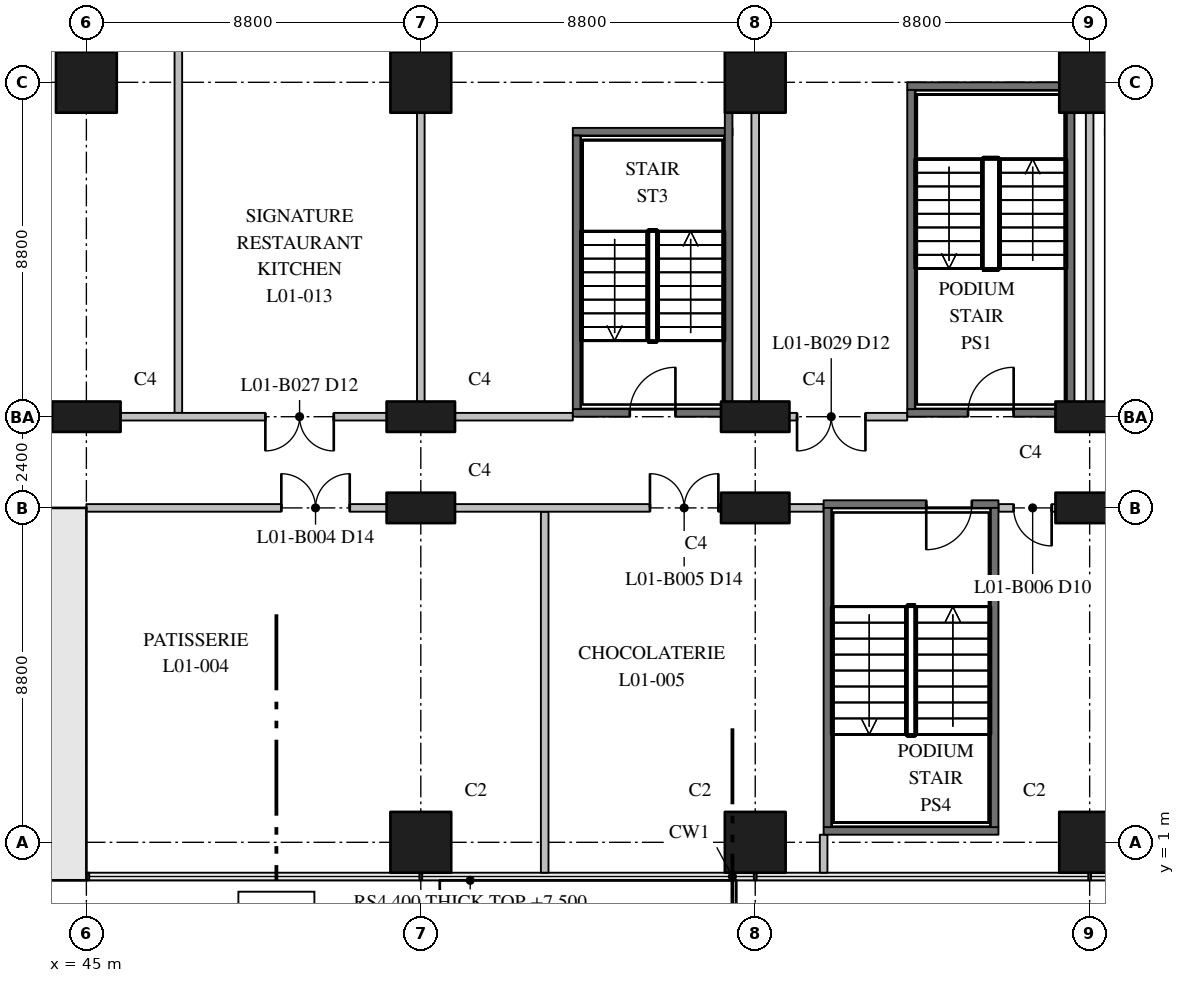
"""IFC4 building model, lengths in metres.
Left out: names, types, materials, properties, quantities, classifications, styles, units other than length and angle.
Written with IfcOpenShell. Run it as: python <this file> out.ifc"""

import sys

from ifc_helpers import new_model, si_unit, direction, frame, frame_2d, origin, origin_2d, place, context, subcontext, project, spatial, rectangle, extrude, element, fill, save


model = new_model("IFC4")
c1 = context("Model", 3, precision=1e-05, world=origin(), true_north=direction((0.0, 1.0)))
c2 = subcontext(c1, "Body", "Model", "MODEL_VIEW")
j1 = project(units=[si_unit("LENGTHUNIT", "METRE"), si_unit("PLANEANGLEUNIT", "RADIAN")], contexts=[c1])
p1 = place(None, origin())
s1 = spatial("IfcSite", under=j1, at=p1, CompositionType="ELEMENT")
p2 = place(p1, origin())
s2 = spatial("IfcBuilding", under=s1, at=p2, CompositionType="ELEMENT")
p3 = place(p2, frame((0.0, 0.0, 7.5)))
s3 = spatial("IfcBuildingStorey", under=s2, at=p3, CompositionType="ELEMENT", Elevation=7.5)
p4 = place(p3, frame((45.0, 12.2, 0.0), z_axis=(0.0, 0.0, 1.0), x_axis=(1.0, 0.0, 0.0)))
e1 = element("IfcColumn", 1, at=p4, inside=s3, PredefinedType="COLUMN", context=c2, shape_type="SweptSolid", body=[
    extrude(rectangle(XDim=1.8, YDim=0.8, at=origin_2d()), origin(), (0.0, 0.0, 1.0), 5.5),
])
for number, where, z_axis, x_axis in (
    (2, (45.0, 21.0, 0.0), (0.0, 0.0, 1.0), (1.0, 0.0, 0.0)),
    (3, (53.8, 1.0, 0.0), (0.0, 0.0, 1.0), (1.0, 0.0, 0.0)),
):
    element("IfcColumn", number, at=place(p3, frame(where, z_axis=z_axis, x_axis=x_axis)), inside=s3, PredefinedType="COLUMN", context=c2, shape_type="SweptSolid", body=[
        extrude(rectangle(XDim=1.6, YDim=1.6, at=origin_2d()), origin(), (0.0, 0.0, 1.0), 5.5),
    ])
for number, where, z_axis, x_axis in (
    (4, (53.8, 9.8, 0.0), (0.0, 0.0, 1.0), (1.0, 0.0, 0.0)),
    (5, (53.8, 12.2, 0.0), (0.0, 0.0, 1.0), (1.0, 0.0, 0.0)),
):
    element("IfcColumn", number, at=place(p3, frame(where, z_axis=z_axis, x_axis=x_axis)), inside=s3, PredefinedType="COLUMN", context=c2, shape_type="SweptSolid", body=[
        extrude(rectangle(XDim=1.8, YDim=0.8, at=origin_2d()), origin(), (0.0, 0.0, 1.0), 5.5),
    ])
for number, where, z_axis, x_axis in (
    (6, (53.8, 21.0, 0.0), (0.0, 0.0, 1.0), (1.0, 0.0, 0.0)),
    (7, (62.6, 1.0, 0.0), (0.0, 0.0, 1.0), (1.0, 0.0, 0.0)),
):
    element("IfcColumn", number, at=place(p3, frame(where, z_axis=z_axis, x_axis=x_axis)), inside=s3, PredefinedType="COLUMN", context=c2, shape_type="SweptSolid", body=[
        extrude(rectangle(XDim=1.6, YDim=1.6, at=origin_2d()), origin(), (0.0, 0.0, 1.0), 5.5),
    ])
for number, where, z_axis, x_axis in (
    (8, (62.6, 9.8, 0.0), (0.0, 0.0, 1.0), (1.0, 0.0, 0.0)),
    (9, (62.6, 12.2, 0.0), (0.0, 0.0, 1.0), (1.0, 0.0, 0.0)),
):
    element("IfcColumn", number, at=place(p3, frame(where, z_axis=z_axis, x_axis=x_axis)), inside=s3, PredefinedType="COLUMN", context=c2, shape_type="SweptSolid", body=[
        extrude(rectangle(XDim=1.8, YDim=0.8, at=origin_2d()), origin(), (0.0, 0.0, 1.0), 5.5),
    ])
for number, where, z_axis, x_axis in (
    (10, (62.6, 21.0, 0.0), (0.0, 0.0, 1.0), (1.0, 0.0, 0.0)),
    (11, (71.4, 1.0, 0.0), (0.0, 0.0, 1.0), (1.0, 0.0, 0.0)),
):
    element("IfcColumn", number, at=place(p3, frame(where, z_axis=z_axis, x_axis=x_axis)), inside=s3, PredefinedType="COLUMN", context=c2, shape_type="SweptSolid", body=[
        extrude(rectangle(XDim=1.6, YDim=1.6, at=origin_2d()), origin(), (0.0, 0.0, 1.0), 5.5),
    ])
for number, where, z_axis, x_axis in (
    (12, (71.4, 9.8, 0.0), (0.0, 0.0, 1.0), (1.0, 0.0, 0.0)),
    (13, (71.4, 12.2, 0.0), (0.0, 0.0, 1.0), (1.0, 0.0, 0.0)),
):
    element("IfcColumn", number, at=place(p3, frame(where, z_axis=z_axis, x_axis=x_axis)), inside=s3, PredefinedType="COLUMN", context=c2, shape_type="SweptSolid", body=[
        extrude(rectangle(XDim=1.8, YDim=0.8, at=origin_2d()), origin(), (0.0, 0.0, 1.0), 5.5),
    ])
p5 = place(p3, frame((71.4, 21.0, 0.0), z_axis=(0.0, 0.0, 1.0), x_axis=(1.0, 0.0, 0.0)))
e14 = element("IfcColumn", 14, at=p5, inside=s3, PredefinedType="COLUMN", context=c2, shape_type="SweptSolid", body=[
    extrude(rectangle(XDim=1.6, YDim=1.6, at=origin_2d()), origin(), (0.0, 0.0, 1.0), 5.5),
])
p6 = place(p3, frame((9.8, 0.6, 0.0), z_axis=(0.0, 0.0, 1.0), x_axis=(1.0, 0.0, 0.0)))
e15 = element("IfcWall", 15, at=p6, inside=s3, PredefinedType="SHEAR", context=c2, shape_type="SweptSolid", body=[
    extrude(rectangle(XDim=35.2, YDim=1.2, at=frame_2d((17.6, 0.0))), origin(), (0.0, 0.0, 1.0), 5.5),
])
p7 = place(p3, frame((44.4, 1.2, 0.0), z_axis=(0.0, 0.0, 1.0), x_axis=(0.0, 1.0, 0.0)))
e16 = element("IfcWall", 16, at=p7, inside=s3, PredefinedType="SHEAR", context=c2, shape_type="SweptSolid", body=[
    extrude(rectangle(XDim=8.6, YDim=1.2, at=frame_2d((4.3, 0.0))), origin(), (0.0, 0.0, 1.0), 5.5),
])
p8 = place(p3, frame((40.7, 9.6, 0.0), z_axis=(0.0, 0.0, 1.0), x_axis=(1.0, 0.0, 0.0)))
e17 = element("IfcWall", 17, at=p8, inside=s3, PredefinedType="SHEAR", context=c2, shape_type="SweptSolid", body=[
    extrude(rectangle(XDim=4.3, YDim=0.4, at=frame_2d((2.15, 0.0))), origin(), (0.0, 0.0, 1.0), 5.5),
])
p9 = place(p8, frame((1.05, 0.0, 0.0)))
e18 = element("IfcOpeningElement", 18, at=p9, cuts=e17, PredefinedType="OPENING", context=c2, shape_type="SweptSolid", body=[
    extrude(rectangle(XDim=1.2, YDim=2.1, at=frame_2d((0.6, 1.05))), frame((0.0, 0.21, 0.0), z_axis=(0.0, -1.0, 0.0), x_axis=(1.0, 0.0, 0.0)), (0.0, 0.0, 1.0), 0.42),
])
p10 = place(p3, frame((57.8, 12.3, 0.0), z_axis=(0.0, 0.0, 1.0), x_axis=(1.0, 0.0, 0.0)))
e19 = element("IfcWall", 19, at=p10, inside=s3, PredefinedType="SHEAR", context=c2, shape_type="SweptSolid", body=[
    extrude(rectangle(XDim=4.2, YDim=0.2, at=frame_2d((2.1, 0.0))), origin(), (0.0, 0.0, 1.0), 5.1),
])
p11 = place(p10, frame((1.5, 0.0, 0.0)))
e20 = element("IfcOpeningElement", 20, at=p11, cuts=e19, PredefinedType="OPENING", context=c2, shape_type="SweptSolid", body=[
    extrude(rectangle(XDim=1.2, YDim=2.1, at=frame_2d((0.6, 1.05))), frame((0.0, 0.11, 0.0), z_axis=(0.0, -1.0, 0.0), x_axis=(1.0, 0.0, 0.0)), (0.0, 0.0, 1.0), 0.22),
])
p12 = place(p3, frame((57.8, 19.7, 0.0), z_axis=(0.0, 0.0, 1.0), x_axis=(1.0, 0.0, 0.0)))
e21 = element("IfcWall", 21, at=p12, inside=s3, PredefinedType="SHEAR", context=c2, shape_type="SweptSolid", body=[
    extrude(rectangle(XDim=4.2, YDim=0.2, at=frame_2d((2.1, 0.0))), origin(), (0.0, 0.0, 1.0), 5.1),
])
p13 = place(p3, frame((57.9, 12.4, 0.0), z_axis=(0.0, 0.0, 1.0), x_axis=(0.0, 1.0, 0.0)))
e22 = element("IfcWall", 22, at=p13, inside=s3, PredefinedType="SHEAR", context=c2, shape_type="SweptSolid", body=[
    extrude(rectangle(XDim=7.2, YDim=0.2, at=frame_2d((3.6, 0.0))), origin(), (0.0, 0.0, 1.0), 5.1),
])
for number, where, z_axis, x_axis in (
    (23, (61.9, 12.4, 0.0), (0.0, 0.0, 1.0), (0.0, 1.0, 0.0)),
    (24, (71.9, 12.4, 0.0), (0.0, 0.0, 1.0), (0.0, 1.0, 0.0)),
):
    element("IfcWall", number, at=place(p3, frame(where, z_axis=z_axis, x_axis=x_axis)), inside=s3, PredefinedType="SHEAR", context=c2, shape_type="SweptSolid", body=[
        extrude(rectangle(XDim=7.8, YDim=0.2, at=frame_2d((3.9, 0.0))), origin(), (0.0, 0.0, 1.0), 5.1),
    ])
p14 = place(p3, frame((66.6, 12.3, 0.0), z_axis=(0.0, 0.0, 1.0), x_axis=(1.0, 0.0, 0.0)))
e25 = element("IfcWall", 25, at=p14, inside=s3, PredefinedType="SHEAR", context=c2, shape_type="SweptSolid", body=[
    extrude(rectangle(XDim=4.4, YDim=0.2, at=frame_2d((2.2, 0.0))), origin(), (0.0, 0.0, 1.0), 5.1),
])
p15 = place(p14, frame((1.6, 0.0, 0.0)))
e26 = element("IfcOpeningElement", 26, at=p15, cuts=e25, PredefinedType="OPENING", context=c2, shape_type="SweptSolid", body=[
    extrude(rectangle(XDim=1.2, YDim=2.1, at=frame_2d((0.6, 1.05))), frame((0.0, 0.11, 0.0), z_axis=(0.0, -1.0, 0.0), x_axis=(1.0, 0.0, 0.0)), (0.0, 0.0, 1.0), 0.22),
])
p16 = place(p3, frame((66.6, 20.9, 0.0), z_axis=(0.0, 0.0, 1.0), x_axis=(1.0, 0.0, 0.0)))
e27 = element("IfcWall", 27, at=p16, inside=s3, PredefinedType="SHEAR", context=c2, shape_type="SweptSolid", body=[
    extrude(rectangle(XDim=4.4, YDim=0.2, at=frame_2d((2.2, 0.0))), origin(), (0.0, 0.0, 1.0), 5.1),
])
for number, where, z_axis, x_axis in (
    (28, (66.7, 12.4, 0.0), (0.0, 0.0, 1.0), (0.0, 1.0, 0.0)),
    (29, (70.9, 12.4, 0.0), (0.0, 0.0, 1.0), (0.0, 1.0, 0.0)),
):
    element("IfcWall", number, at=place(p3, frame(where, z_axis=z_axis, x_axis=x_axis)), inside=s3, PredefinedType="SHEAR", context=c2, shape_type="SweptSolid", body=[
        extrude(rectangle(XDim=8.4, YDim=0.2, at=frame_2d((4.2, 0.0))), origin(), (0.0, 0.0, 1.0), 5.1),
    ])
p17 = place(p3, frame((64.4, 9.9, 0.0), z_axis=(0.0, 0.0, 1.0), x_axis=(1.0, 0.0, 0.0)))
e30 = element("IfcWall", 30, at=p17, inside=s3, PredefinedType="SHEAR", context=c2, shape_type="SweptSolid", body=[
    extrude(rectangle(XDim=4.6, YDim=0.2, at=frame_2d((2.3, 0.0))), origin(), (0.0, 0.0, 1.0), 5.1),
])
p18 = place(p17, frame((2.7, 0.0, 0.0)))
e31 = element("IfcOpeningElement", 31, at=p18, cuts=e30, PredefinedType="OPENING", context=c2, shape_type="SweptSolid", body=[
    extrude(rectangle(XDim=1.2, YDim=2.1, at=frame_2d((0.6, 1.05))), frame((0.0, 0.11, 0.0), z_axis=(0.0, -1.0, 0.0), x_axis=(1.0, 0.0, 0.0)), (0.0, 0.0, 1.0), 0.22),
])
p19 = place(p3, frame((64.4, 1.3, 0.0), z_axis=(0.0, 0.0, 1.0), x_axis=(1.0, 0.0, 0.0)))
e32 = element("IfcWall", 32, at=p19, inside=s3, PredefinedType="SHEAR", context=c2, shape_type="SweptSolid", body=[
    extrude(rectangle(XDim=4.6, YDim=0.2, at=frame_2d((2.3, 0.0))), origin(), (0.0, 0.0, 1.0), 5.1),
])
for number, where, z_axis, x_axis in (
    (33, (64.5, 1.4, 0.0), (0.0, 0.0, 1.0), (0.0, 1.0, 0.0)),
    (34, (68.9, 1.4, 0.0), (0.0, 0.0, 1.0), (0.0, 1.0, 0.0)),
):
    element("IfcWall", number, at=place(p3, frame(where, z_axis=z_axis, x_axis=x_axis)), inside=s3, PredefinedType="SHEAR", context=c2, shape_type="SweptSolid", body=[
        extrude(rectangle(XDim=8.4, YDim=0.2, at=frame_2d((4.2, 0.0))), origin(), (0.0, 0.0, 1.0), 5.1),
    ])
p20 = place(p3, frame((45.0, 9.8, 0.0), z_axis=(0.0, 0.0, 1.0), x_axis=(1.0, 0.0, 0.0)))
e35 = element("IfcWall", 35, at=p20, inside=s3, PredefinedType="PARTITIONING", context=c2, shape_type="SweptSolid", body=[
    extrude(rectangle(XDim=19.4, YDim=0.2, at=frame_2d((9.7, 0.0))), origin(), (0.0, 0.0, 1.0), 5.1),
])
p21 = place(p20, frame((5.13, 0.0, 0.0)))
e36 = element("IfcOpeningElement", 36, at=p21, cuts=e35, PredefinedType="OPENING", context=c2, shape_type="SweptSolid", body=[
    extrude(rectangle(XDim=1.8, YDim=2.4, at=frame_2d((0.9, 1.2))), frame((0.0, 0.11, 0.0), z_axis=(0.0, -1.0, 0.0), x_axis=(1.0, 0.0, 0.0)), (0.0, 0.0, 1.0), 0.22),
])
p22 = place(p20, frame((14.83, 0.0, 0.0)))
e37 = element("IfcOpeningElement", 37, at=p22, cuts=e35, PredefinedType="OPENING", context=c2, shape_type="SweptSolid", body=[
    extrude(rectangle(XDim=1.8, YDim=2.4, at=frame_2d((0.9, 1.2))), frame((0.0, 0.11, 0.0), z_axis=(0.0, -1.0, 0.0), x_axis=(1.0, 0.0, 0.0)), (0.0, 0.0, 1.0), 0.22),
])
p23 = place(p3, frame((69.0, 9.8, 0.0), z_axis=(0.0, 0.0, 1.0), x_axis=(1.0, 0.0, 0.0)))
e38 = element("IfcWall", 38, at=p23, inside=s3, PredefinedType="PARTITIONING", context=c2, shape_type="SweptSolid", body=[
    extrude(rectangle(XDim=3.8, YDim=0.2, at=frame_2d((1.9, 0.0))), origin(), (0.0, 0.0, 1.0), 5.1),
])
p24 = place(p23, frame((0.4, 0.0, 0.0)))
e39 = element("IfcOpeningElement", 39, at=p24, cuts=e38, PredefinedType="OPENING", context=c2, shape_type="SweptSolid", body=[
    extrude(rectangle(XDim=1.0, YDim=2.1, at=frame_2d((0.5, 1.05))), frame((0.0, 0.11, 0.0), z_axis=(0.0, -1.0, 0.0), x_axis=(1.0, 0.0, 0.0)), (0.0, 0.0, 1.0), 0.22),
])
p25 = place(p3, frame((35.4, 12.2, 0.0), z_axis=(0.0, 0.0, 1.0), x_axis=(1.0, 0.0, 0.0)))
e40 = element("IfcWall", 40, at=p25, inside=s3, PredefinedType="PARTITIONING", context=c2, shape_type="SweptSolid", body=[
    extrude(rectangle(XDim=22.4, YDim=0.2, at=frame_2d((11.2, 0.0))), origin(), (0.0, 0.0, 1.0), 5.1),
])
p26 = place(p25, frame((5.51, 0.0, 0.0)))
e41 = element("IfcOpeningElement", 41, at=p26, cuts=e40, PredefinedType="OPENING", context=c2, shape_type="SweptSolid", body=[
    extrude(rectangle(XDim=1.8, YDim=2.4, at=frame_2d((0.9, 1.2))), frame((0.0, 0.11, 0.0), z_axis=(0.0, -1.0, 0.0), x_axis=(1.0, 0.0, 0.0)), (0.0, 0.0, 1.0), 0.22),
])
p27 = place(p25, frame((14.31, 0.0, 0.0)))
e42 = element("IfcOpeningElement", 42, at=p27, cuts=e40, PredefinedType="OPENING", context=c2, shape_type="SweptSolid", body=[
    extrude(rectangle(XDim=1.8, YDim=2.1, at=frame_2d((0.9, 1.05))), frame((0.0, 0.11, 0.0), z_axis=(0.0, -1.0, 0.0), x_axis=(1.0, 0.0, 0.0)), (0.0, 0.0, 1.0), 0.22),
])
p28 = place(p3, frame((62.0, 12.2, 0.0), z_axis=(0.0, 0.0, 1.0), x_axis=(1.0, 0.0, 0.0)))
e43 = element("IfcWall", 43, at=p28, inside=s3, PredefinedType="PARTITIONING", context=c2, shape_type="SweptSolid", body=[
    extrude(rectangle(XDim=4.6, YDim=0.2, at=frame_2d((2.3, 0.0))), origin(), (0.0, 0.0, 1.0), 5.1),
])
p29 = place(p28, frame((1.7, 0.0, 0.0)))
e44 = element("IfcOpeningElement", 44, at=p29, cuts=e43, PredefinedType="OPENING", context=c2, shape_type="SweptSolid", body=[
    extrude(rectangle(XDim=1.8, YDim=2.1, at=frame_2d((0.9, 1.05))), frame((0.0, 0.11, 0.0), z_axis=(0.0, -1.0, 0.0), x_axis=(1.0, 0.0, 0.0)), (0.0, 0.0, 1.0), 0.22),
])
p30 = place(p3, frame((71.0, 12.2, 0.0), z_axis=(0.0, 0.0, 1.0), x_axis=(1.0, 0.0, 0.0)))
e45 = element("IfcWall", 45, at=p30, inside=s3, PredefinedType="PARTITIONING", context=c2, shape_type="SweptSolid", body=[
    extrude(rectangle(XDim=0.8, YDim=0.2, at=frame_2d((0.4, 0.0))), origin(), (0.0, 0.0, 1.0), 5.1),
])
p31 = place(p3, frame((57.06, 0.2, 0.0), z_axis=(0.0, 0.0, 1.0), x_axis=(0.0, 1.0, 0.0)))
e46 = element("IfcWall", 46, at=p31, inside=s3, PredefinedType="PARTITIONING", context=c2, shape_type="SweptSolid", body=[
    extrude(rectangle(XDim=9.5, YDim=0.2, at=frame_2d((4.75, 0.0))), origin(), (0.0, 0.0, 1.0), 5.1),
])
p32 = place(p3, frame((64.4, 0.2, 0.0), z_axis=(0.0, 0.0, 1.0), x_axis=(0.0, 1.0, 0.0)))
e47 = element("IfcWall", 47, at=p32, inside=s3, PredefinedType="PARTITIONING", context=c2, shape_type="SweptSolid", body=[
    extrude(rectangle(XDim=1.0, YDim=0.2, at=frame_2d((0.5, 0.0))), origin(), (0.0, 0.0, 1.0), 5.1),
])
for number, where, z_axis, x_axis in (
    (48, (47.42, 12.3, 0.0), (0.0, 0.0, 1.0), (0.0, 1.0, 0.0)),
    (49, (53.8, 12.3, 0.0), (0.0, 0.0, 1.0), (0.0, 1.0, 0.0)),
    (50, (62.6, 12.3, 0.0), (0.0, 0.0, 1.0), (0.0, 1.0, 0.0)),
):
    element("IfcWall", number, at=place(p3, frame(where, z_axis=z_axis, x_axis=x_axis)), inside=s3, PredefinedType="PARTITIONING", context=c2, shape_type="SweptSolid", body=[
        extrude(rectangle(XDim=14.4, YDim=0.2, at=frame_2d((7.2, 0.0))), origin(), (0.0, 0.0, 1.0), 5.1),
    ])
p33 = place(p3, frame((71.4, 12.3, 0.0), z_axis=(0.0, 0.0, 1.0), x_axis=(0.0, 1.0, 0.0)))
e51 = element("IfcWall", 51, at=p33, inside=s3, PredefinedType="PARTITIONING", context=c2, shape_type="SweptSolid", body=[
    extrude(rectangle(XDim=14.3, YDim=0.2, at=frame_2d((7.15, 0.0))), origin(), (0.0, 0.0, 1.0), 5.1),
])
p34 = place(p11, origin())
e52 = element("IfcDoor", 52, at=p34, inside=s3, OperationType="SINGLE_SWING_RIGHT", PredefinedType="DOOR", context=c2, shape_type="SweptSolid", body=[
    extrude(rectangle(XDim=1.2, YDim=2.1, at=frame_2d((0.6, 1.05))), frame((0.0, 0.025, 0.0), z_axis=(0.0, -1.0, 0.0), x_axis=(1.0, 0.0, 0.0)), (0.0, 0.0, 1.0), 0.05),
])
fill(e20, e52)
p35 = place(p15, origin())
e53 = element("IfcDoor", 53, at=p35, inside=s3, OperationType="SINGLE_SWING_RIGHT", PredefinedType="DOOR", context=c2, shape_type="SweptSolid", body=[
    extrude(rectangle(XDim=1.2, YDim=2.1, at=frame_2d((0.6, 1.05))), frame((0.0, 0.025, 0.0), z_axis=(0.0, -1.0, 0.0), x_axis=(1.0, 0.0, 0.0)), (0.0, 0.0, 1.0), 0.05),
])
fill(e26, e53)
p36 = place(p18, frame((1.2, 0.0, 0.0), z_axis=(0.0, 0.0, 1.0), x_axis=(-1.0, 0.0, 0.0)))
e54 = element("IfcDoor", 54, at=p36, inside=s3, OperationType="SINGLE_SWING_LEFT", PredefinedType="DOOR", context=c2, shape_type="SweptSolid", body=[
    extrude(rectangle(XDim=1.2, YDim=2.1, at=frame_2d((0.6, 1.05))), frame((0.0, 0.025, 0.0), z_axis=(0.0, -1.0, 0.0), x_axis=(1.0, 0.0, 0.0)), (0.0, 0.0, 1.0), 0.05),
])
fill(e31, e54)
p37 = place(p21, origin())
e55 = element("IfcDoor", 55, at=p37, inside=s3, OperationType="DOUBLE_DOOR_SINGLE_SWING", PredefinedType="DOOR", context=c2, shape_type="SweptSolid", body=[
    extrude(rectangle(XDim=1.8, YDim=2.4, at=frame_2d((0.9, 1.2))), frame((0.0, 0.025, 0.0), z_axis=(0.0, -1.0, 0.0), x_axis=(1.0, 0.0, 0.0)), (0.0, 0.0, 1.0), 0.05),
])
fill(e36, e55)
p38 = place(p22, origin())
e56 = element("IfcDoor", 56, at=p38, inside=s3, OperationType="DOUBLE_DOOR_SINGLE_SWING", PredefinedType="DOOR", context=c2, shape_type="SweptSolid", body=[
    extrude(rectangle(XDim=1.8, YDim=2.4, at=frame_2d((0.9, 1.2))), frame((0.0, 0.025, 0.0), z_axis=(0.0, -1.0, 0.0), x_axis=(1.0, 0.0, 0.0)), (0.0, 0.0, 1.0), 0.05),
])
fill(e37, e56)
p39 = place(p24, frame((1.0, 0.0, 0.0), z_axis=(0.0, 0.0, 1.0), x_axis=(-1.0, 0.0, 0.0)))
e57 = element("IfcDoor", 57, at=p39, inside=s3, OperationType="SINGLE_SWING_RIGHT", PredefinedType="DOOR", context=c2, shape_type="SweptSolid", body=[
    extrude(rectangle(XDim=1.0, YDim=2.1, at=frame_2d((0.5, 1.05))), frame((0.0, 0.025, 0.0), z_axis=(0.0, -1.0, 0.0), x_axis=(1.0, 0.0, 0.0)), (0.0, 0.0, 1.0), 0.05),
])
fill(e39, e57)
p40 = place(p27, frame((1.8, 0.0, 0.0), z_axis=(0.0, 0.0, 1.0), x_axis=(-1.0, 0.0, 0.0)))
e58 = element("IfcDoor", 58, at=p40, inside=s3, OperationType="DOUBLE_DOOR_SINGLE_SWING", PredefinedType="DOOR", context=c2, shape_type="SweptSolid", body=[
    extrude(rectangle(XDim=1.8, YDim=2.1, at=frame_2d((0.9, 1.05))), frame((0.0, 0.025, 0.0), z_axis=(0.0, -1.0, 0.0), x_axis=(1.0, 0.0, 0.0)), (0.0, 0.0, 1.0), 0.05),
])
fill(e42, e58)
p41 = place(p29, frame((1.8, 0.0, 0.0), z_axis=(0.0, 0.0, 1.0), x_axis=(-1.0, 0.0, 0.0)))
e59 = element("IfcDoor", 59, at=p41, inside=s3, OperationType="DOUBLE_DOOR_SINGLE_SWING", PredefinedType="DOOR", context=c2, shape_type="SweptSolid", body=[
    extrude(rectangle(XDim=1.8, YDim=2.1, at=frame_2d((0.9, 1.05))), frame((0.0, 0.025, 0.0), z_axis=(0.0, -1.0, 0.0), x_axis=(1.0, 0.0, 0.0)), (0.0, 0.0, 1.0), 0.05),
])
fill(e44, e59)
save(model, sys.argv[1])
